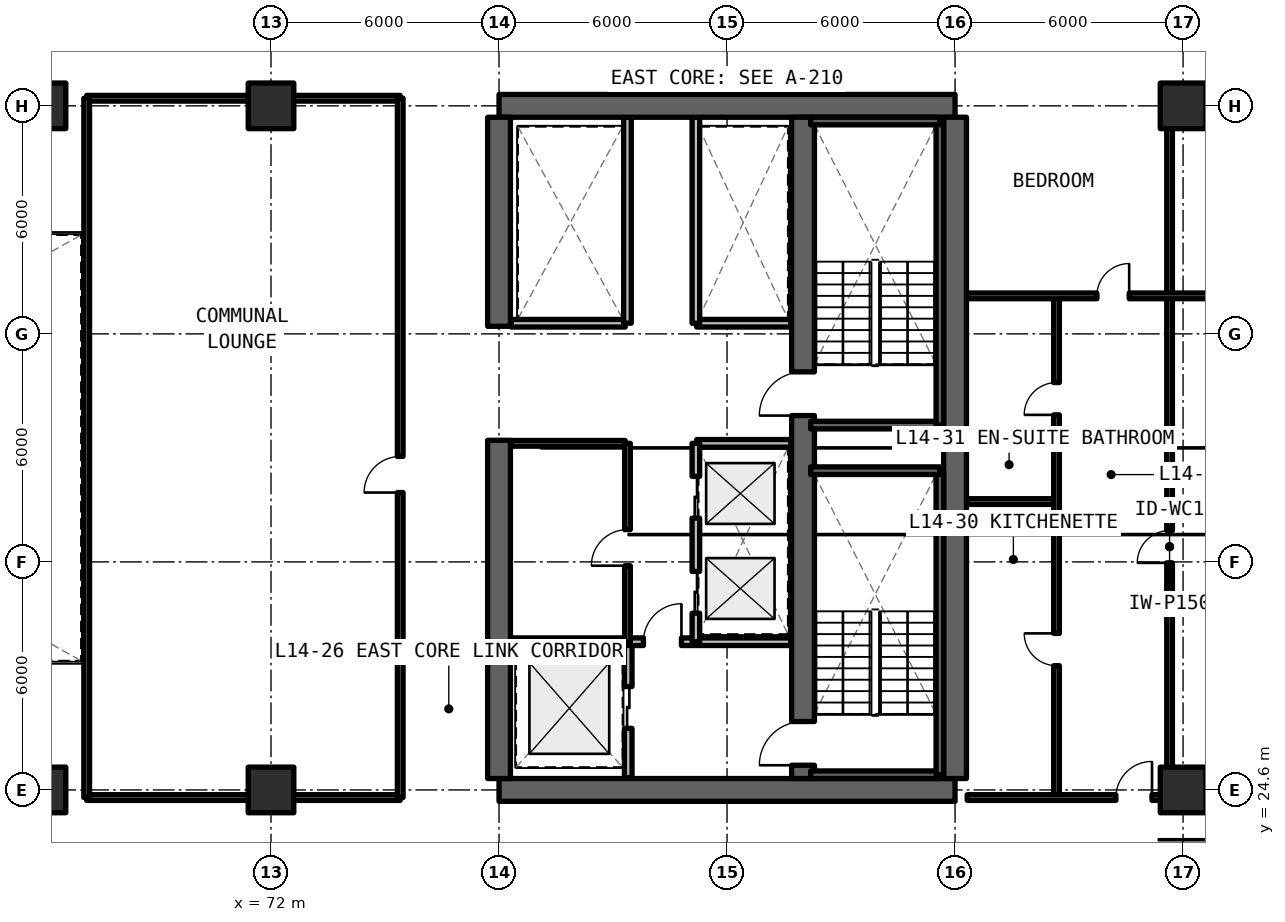
"""IFC4 building model, lengths in metres.
Left out: names, types, materials, properties, quantities, classifications, styles, units other than length and angle.
Written with IfcOpenShell. Run it as: python <this file> out.ifc"""

import sys

from ifc_helpers import new_model, si_unit, direction, frame, frame_2d, origin, origin_2d, place, context, subcontext, project, spatial, rectangle, extrude, element, fill, save


model = new_model("IFC4")
c1 = context("Model", 3, precision=1e-05, world=origin(), true_north=direction((0.0, 1.0)))
c2 = subcontext(c1, "Body", "Model", "MODEL_VIEW")
j1 = project(units=[si_unit("LENGTHUNIT", "METRE"), si_unit("PLANEANGLEUNIT", "RADIAN")], contexts=[c1])
p1 = place(None, origin())
s1 = spatial("IfcSite", under=j1, at=p1, CompositionType="ELEMENT")
p2 = place(p1, origin())
s2 = spatial("IfcBuilding", under=s1, at=p2, CompositionType="ELEMENT")
p3 = place(p2, frame((0.0, 0.0, 52.14)))
s3 = spatial("IfcBuildingStorey", under=s2, at=p3, CompositionType="ELEMENT", Elevation=52.14)
for number, where, z_axis, x_axis in (
    (1, (78.0, 24.6, 0.0), (0.0, 0.0, 1.0), (1.0, 0.0, 0.0)),
    (2, (90.0, 42.6, 0.0), (0.0, 0.0, 1.0), (-1.0, 0.0, 0.0)),
):
    element("IfcWall", number, at=place(p3, frame(where, z_axis=z_axis, x_axis=x_axis)), inside=s3, PredefinedType="SHEAR", context=c2, shape_type="SweptSolid", body=[
        extrude(rectangle(XDim=12.0, YDim=0.6, at=frame_2d((6.0, 0.0))), origin(), (0.0, 0.0, 1.0), 3.3),
    ])
p4 = place(p3, frame((90.0, 24.9, 0.0), z_axis=(0.0, 0.0, 1.0), x_axis=(0.0, 1.0, 0.0)))
e3 = element("IfcWall", 3, at=p4, inside=s3, PredefinedType="SHEAR", context=c2, shape_type="SweptSolid", body=[
    extrude(rectangle(XDim=17.4, YDim=0.6, at=frame_2d((8.7, 0.0))), origin(), (0.0, 0.0, 1.0), 3.3),
])
p5 = place(p3, frame((78.0, 24.9, 0.0), z_axis=(0.0, 0.0, 1.0), x_axis=(0.0, 1.0, 0.0)))
e4 = element("IfcWall", 4, at=p5, inside=s3, PredefinedType="SHEAR", context=c2, shape_type="SweptSolid", body=[
    extrude(rectangle(XDim=8.9, YDim=0.6, at=frame_2d((4.45, 0.0))), origin(), (0.0, 0.0, 1.0), 3.3),
])
p6 = place(p3, frame((78.0, 36.8, 0.0), z_axis=(0.0, 0.0, 1.0), x_axis=(0.0, 1.0, 0.0)))
e5 = element("IfcWall", 5, at=p6, inside=s3, PredefinedType="SHEAR", context=c2, shape_type="SweptSolid", body=[
    extrude(rectangle(XDim=5.5, YDim=0.6, at=frame_2d((2.75, 0.0))), origin(), (0.0, 0.0, 1.0), 3.3),
])
p7 = place(p3, frame((86.0, 24.9, 0.0), z_axis=(0.0, 0.0, 1.0), x_axis=(0.0, 1.0, 0.0)))
e6 = element("IfcWall", 6, at=p7, inside=s3, PredefinedType="SHEAR", context=c2, shape_type="SweptSolid", body=[
    extrude(rectangle(XDim=17.4, YDim=0.6, at=frame_2d((8.7, 0.0))), origin(), (0.0, 0.0, 1.0), 3.3),
])
p8 = place(p7, frame((0.35, 0.0, 0.0)))
e7 = element("IfcOpeningElement", 7, at=p8, cuts=e6, PredefinedType="OPENING", context=c2, shape_type="SweptSolid", body=[
    extrude(rectangle(XDim=1.15, YDim=2.15, at=frame_2d((0.575, 1.075))), frame((0.0, 0.31, 0.0), z_axis=(0.0, -1.0, 0.0), x_axis=(1.0, 0.0, 0.0)), (0.0, 0.0, 1.0), 0.62),
])
p9 = place(p7, frame((9.55, 0.0, 0.0)))
e8 = element("IfcOpeningElement", 8, at=p9, cuts=e6, PredefinedType="OPENING", context=c2, shape_type="SweptSolid", body=[
    extrude(rectangle(XDim=1.15, YDim=2.15, at=frame_2d((0.575, 1.075))), frame((0.0, 0.31, 0.0), z_axis=(0.0, -1.0, 0.0), x_axis=(1.0, 0.0, 0.0)), (0.0, 0.0, 1.0), 0.62),
])
for number, where, z_axis, x_axis in (
    (9, (66.0, 24.6, 0.0), (0.0, 0.0, 1.0), (1.0, 0.0, 0.0)),
    (10, (66.0, 42.6, 0.0), (0.0, 0.0, 1.0), (1.0, 0.0, 0.0)),
    (11, (72.0, 24.6, 0.0), (0.0, 0.0, 1.0), (1.0, 0.0, 0.0)),
    (12, (72.0, 42.6, 0.0), (0.0, 0.0, 1.0), (1.0, 0.0, 0.0)),
    (13, (96.0, 24.6, 0.0), (0.0, 0.0, 1.0), (1.0, 0.0, 0.0)),
    (14, (96.0, 42.6, 0.0), (0.0, 0.0, 1.0), (1.0, 0.0, 0.0)),
):
    element("IfcColumn", number, at=place(p3, frame(where, z_axis=z_axis, x_axis=x_axis)), inside=s3, PredefinedType="COLUMN", context=c2, shape_type="SweptSolid", body=[
        extrude(rectangle(XDim=1.2, YDim=1.2, at=origin_2d()), origin(), (0.0, 0.0, 1.0), 3.3),
    ])
p10 = place(p3, frame((81.4, 24.92, 0.0), z_axis=(0.0, 0.0, 1.0), x_axis=(0.0, 1.0, 0.0)))
e15 = element("IfcWall", 15, at=p10, inside=s3, PredefinedType="SOLIDWALL", context=c2, shape_type="SweptSolid", body=[
    extrude(rectangle(XDim=3.58, YDim=0.2, at=frame_2d((1.79, 0.0))), origin(), (0.0, 0.0, 1.0), 2.35),
])
p11 = place(p10, frame((1.3, 0.0, 0.0)))
e16 = element("IfcOpeningElement", 16, at=p11, cuts=e15, PredefinedType="OPENING", context=c2, shape_type="SweptSolid", body=[
    extrude(rectangle(XDim=1.1, YDim=2.2, at=frame_2d((0.55, 1.1))), frame((0.0, 0.11, 0.0), z_axis=(0.0, -1.0, 0.0), x_axis=(1.0, 0.0, 0.0)), (0.0, 0.0, 1.0), 0.22),
])
p12 = place(p3, frame((78.32, 28.5, 0.0), z_axis=(0.0, 0.0, 1.0), x_axis=(1.0, 0.0, 0.0)))
e17 = element("IfcWall", 17, at=p12, inside=s3, PredefinedType="SOLIDWALL", context=c2, shape_type="SweptSolid", body=[
    extrude(rectangle(XDim=7.36, YDim=0.2, at=frame_2d((3.68, 0.0))), origin(), (0.0, 0.0, 1.0), 2.35),
])
p13 = place(p12, frame((3.48, 0.0, 0.0)))
e18 = element("IfcOpeningElement", 18, at=p13, cuts=e17, PredefinedType="OPENING", context=c2, shape_type="SweptSolid", body=[
    extrude(rectangle(XDim=1.0, YDim=2.15, at=frame_2d((0.5, 1.075))), frame((0.0, 0.11, 0.0), z_axis=(0.0, -1.0, 0.0), x_axis=(1.0, 0.0, 0.0)), (0.0, 0.0, 1.0), 0.22),
])
p14 = place(p3, frame((83.2, 33.72, 0.0), z_axis=(0.0, 0.0, 1.0), x_axis=(1.0, 0.0, 0.0)))
e19 = element("IfcWall", 19, at=p14, inside=s3, PredefinedType="SOLIDWALL", context=c2, shape_type="SweptSolid", body=[
    extrude(rectangle(XDim=2.48, YDim=0.2, at=frame_2d((1.24, 0.0))), origin(), (0.0, 0.0, 1.0), 2.35),
])
p15 = place(p3, frame((83.18, 28.5, 0.0), z_axis=(0.0, 0.0, 1.0), x_axis=(0.0, 1.0, 0.0)))
e20 = element("IfcWall", 20, at=p15, inside=s3, PredefinedType="SOLIDWALL", context=c2, shape_type="SweptSolid", body=[
    extrude(rectangle(XDim=5.22, YDim=0.2, at=frame_2d((2.61, 0.0))), origin(), (0.0, 0.0, 1.0), 2.35),
])
p16 = place(p15, frame((0.75, 0.0, 0.0)))
e21 = element("IfcOpeningElement", 21, at=p16, cuts=e20, PredefinedType="OPENING", context=c2, shape_type="SweptSolid", body=[
    extrude(rectangle(XDim=1.1, YDim=2.2, at=frame_2d((0.55, 1.1))), frame((0.0, 0.11, 0.0), z_axis=(0.0, -1.0, 0.0), x_axis=(1.0, 0.0, 0.0)), (0.0, 0.0, 1.0), 0.22),
])
p17 = place(p15, frame((3.25, 0.0, 0.0)))
e22 = element("IfcOpeningElement", 22, at=p17, cuts=e20, PredefinedType="OPENING", context=c2, shape_type="SweptSolid", body=[
    extrude(rectangle(XDim=1.1, YDim=2.2, at=frame_2d((0.55, 1.1))), frame((0.0, 0.11, 0.0), z_axis=(0.0, -1.0, 0.0), x_axis=(1.0, 0.0, 0.0)), (0.0, 0.0, 1.0), 0.22),
])
p18 = place(p3, frame((78.32, 33.72, 0.0), z_axis=(0.0, 0.0, 1.0), x_axis=(1.0, 0.0, 0.0)))
e23 = element("IfcWall", 23, at=p18, inside=s3, PredefinedType="SOLIDWALL", context=c2, shape_type="SweptSolid", body=[
    extrude(rectangle(XDim=3.0, YDim=0.15, at=frame_2d((1.5, 0.0))), origin(), (0.0, 0.0, 1.0), 2.35),
])
p19 = place(p3, frame((81.38, 28.5, 0.0), z_axis=(0.0, 0.0, 1.0), x_axis=(0.0, 1.0, 0.0)))
e24 = element("IfcWall", 24, at=p19, inside=s3, PredefinedType="SOLIDWALL", context=c2, shape_type="SweptSolid", body=[
    extrude(rectangle(XDim=5.22, YDim=0.15, at=frame_2d((2.61, 0.0))), origin(), (0.0, 0.0, 1.0), 2.35),
])
p20 = place(p19, frame((2.0, 0.0, 0.0)))
e25 = element("IfcOpeningElement", 25, at=p20, cuts=e24, PredefinedType="OPENING", context=c2, shape_type="SweptSolid", body=[
    extrude(rectangle(XDim=0.95, YDim=2.15, at=frame_2d((0.475, 1.075))), frame((0.0, 0.085, 0.0), z_axis=(0.0, -1.0, 0.0), x_axis=(1.0, 0.0, 0.0)), (0.0, 0.0, 1.0), 0.17),
])
p21 = place(p3, frame((83.2, 36.88, 0.0), z_axis=(0.0, 0.0, 1.0), x_axis=(1.0, 0.0, 0.0)))
e26 = element("IfcWall", 26, at=p21, inside=s3, PredefinedType="SOLIDWALL", context=c2, shape_type="SweptSolid", body=[
    extrude(rectangle(XDim=2.48, YDim=0.2, at=frame_2d((1.24, 0.0))), origin(), (0.0, 0.0, 1.0), 2.35),
])
p22 = place(p3, frame((83.18, 36.88, 0.0), z_axis=(0.0, 0.0, 1.0), x_axis=(0.0, 1.0, 0.0)))
e27 = element("IfcWall", 27, at=p22, inside=s3, PredefinedType="SOLIDWALL", context=c2, shape_type="SweptSolid", body=[
    extrude(rectangle(XDim=5.42, YDim=0.2, at=frame_2d((2.71, 0.0))), origin(), (0.0, 0.0, 1.0), 2.35),
])
p23 = place(p3, frame((78.32, 36.88, 0.0), z_axis=(0.0, 0.0, 1.0), x_axis=(1.0, 0.0, 0.0)))
e28 = element("IfcWall", 28, at=p23, inside=s3, PredefinedType="SOLIDWALL", context=c2, shape_type="SweptSolid", body=[
    extrude(rectangle(XDim=3.0, YDim=0.2, at=frame_2d((1.5, 0.0))), origin(), (0.0, 0.0, 1.0), 2.35),
])
p24 = place(p3, frame((81.38, 36.88, 0.0), z_axis=(0.0, 0.0, 1.0), x_axis=(0.0, 1.0, 0.0)))
e29 = element("IfcWall", 29, at=p24, inside=s3, PredefinedType="SOLIDWALL", context=c2, shape_type="SweptSolid", body=[
    extrude(rectangle(XDim=5.42, YDim=0.2, at=frame_2d((2.71, 0.0))), origin(), (0.0, 0.0, 1.0), 2.35),
])
for number, where, z_axis, x_axis in (
    (30, (67.15, 24.4, 0.0), (0.0, 0.0, 1.0), (1.0, 0.0, 0.0)),
    (31, (67.15, 42.8, 0.0), (0.0, 0.0, 1.0), (1.0, 0.0, 0.0)),
):
    element("IfcWall", number, at=place(p3, frame(where, z_axis=z_axis, x_axis=x_axis)), inside=s3, PredefinedType="SOLIDWALL", context=c2, shape_type="SweptSolid", body=[
        extrude(rectangle(XDim=8.25, YDim=0.15, at=frame_2d((4.125, 0.0))), origin(), (0.0, 0.0, 1.0), 2.295),
    ])
p25 = place(p3, frame((67.15, 24.4, 0.0), z_axis=(0.0, 0.0, 1.0), x_axis=(0.0, 1.0, 0.0)))
e32 = element("IfcWall", 32, at=p25, inside=s3, PredefinedType="SOLIDWALL", context=c2, shape_type="SweptSolid", body=[
    extrude(rectangle(XDim=18.4, YDim=0.15, at=frame_2d((9.2, 0.0))), origin(), (0.0, 0.0, 1.0), 2.35),
])
p26 = place(p3, frame((75.4, 24.4, 0.0), z_axis=(0.0, 0.0, 1.0), x_axis=(0.0, 1.0, 0.0)))
e33 = element("IfcWall", 33, at=p26, inside=s3, PredefinedType="SOLIDWALL", context=c2, shape_type="SweptSolid", body=[
    extrude(rectangle(XDim=18.4, YDim=0.15, at=frame_2d((9.2, 0.0))), origin(), (0.0, 0.0, 1.0), 2.35),
])
p27 = place(p26, frame((8.025, 0.0, 0.0)))
e34 = element("IfcOpeningElement", 34, at=p27, cuts=e33, PredefinedType="OPENING", context=c2, shape_type="SweptSolid", body=[
    extrude(rectangle(XDim=0.95, YDim=2.15, at=frame_2d((0.475, 1.075))), frame((0.0, 0.085, 0.0), z_axis=(0.0, -1.0, 0.0), x_axis=(1.0, 0.0, 0.0)), (0.0, 0.0, 1.0), 0.17),
])
p28 = place(p3, frame((95.645, 24.4, 0.0), z_axis=(0.0, 0.0, 1.0), x_axis=(0.0, 1.0, 0.0)))
e35 = element("IfcWall", 35, at=p28, inside=s3, PredefinedType="PARTITIONING", context=c2, shape_type="SweptSolid", body=[
    extrude(rectangle(XDim=13.2, YDim=0.15, at=frame_2d((6.6, 0.0))), origin(), (0.0, 0.0, 1.0), 2.35),
])
p29 = place(p28, frame((6.175, 0.0, 0.0)))
e36 = element("IfcOpeningElement", 36, at=p29, cuts=e35, PredefinedType="OPENING", context=c2, shape_type="SweptSolid", body=[
    extrude(rectangle(XDim=0.85, YDim=2.1, at=frame_2d((0.425, 1.05))), frame((0.0, 0.085, 0.0), z_axis=(0.0, -1.0, 0.0), x_axis=(1.0, 0.0, 0.0)), (0.0, 0.0, 1.0), 0.17),
])
p30 = place(p3, frame((90.32, 32.188, 0.0), z_axis=(0.0, 0.0, 1.0), x_axis=(1.0, 0.0, 0.0)))
e37 = element("IfcWall", 37, at=p30, inside=s3, PredefinedType="PARTITIONING", context=c2, shape_type="SweptSolid", body=[
    extrude(rectangle(XDim=2.35, YDim=0.15, at=frame_2d((1.175, 0.0))), origin(), (0.0, 0.0, 1.0), 2.35),
])
p31 = place(p3, frame((92.67, 24.4, 0.0), z_axis=(0.0, 0.0, 1.0), x_axis=(0.0, 1.0, 0.0)))
e38 = element("IfcWall", 38, at=p31, inside=s3, PredefinedType="PARTITIONING", context=c2, shape_type="SweptSolid", body=[
    extrude(rectangle(XDim=13.2, YDim=0.15, at=frame_2d((6.6, 0.0))), origin(), (0.0, 0.0, 1.0), 2.35),
])
p32 = place(p31, frame((3.469, 0.0, 0.0)))
e39 = element("IfcOpeningElement", 39, at=p32, cuts=e38, PredefinedType="OPENING", context=c2, shape_type="SweptSolid", body=[
    extrude(rectangle(XDim=0.85, YDim=2.1, at=frame_2d((0.425, 1.05))), frame((0.0, 0.085, 0.0), z_axis=(0.0, -1.0, 0.0), x_axis=(1.0, 0.0, 0.0)), (0.0, 0.0, 1.0), 0.17),
])
p33 = place(p31, frame((10.069, 0.0, 0.0)))
e40 = element("IfcOpeningElement", 40, at=p33, cuts=e38, PredefinedType="OPENING", context=c2, shape_type="SweptSolid", body=[
    extrude(rectangle(XDim=0.85, YDim=2.1, at=frame_2d((0.425, 1.05))), frame((0.0, 0.085, 0.0), z_axis=(0.0, -1.0, 0.0), x_axis=(1.0, 0.0, 0.0)), (0.0, 0.0, 1.0), 0.17),
])
p34 = place(p3, frame((95.645, 37.6, 0.0), z_axis=(0.0, 0.0, 1.0), x_axis=(0.0, 1.0, 0.0)))
e41 = element("IfcWall", 41, at=p34, inside=s3, PredefinedType="PARTITIONING", context=c2, shape_type="SweptSolid", body=[
    extrude(rectangle(XDim=5.2, YDim=0.15, at=frame_2d((2.6, 0.0))), origin(), (0.0, 0.0, 1.0), 2.35),
])
p35 = place(p3, frame((90.32, 37.6, 0.0), z_axis=(0.0, 0.0, 1.0), x_axis=(1.0, 0.0, 0.0)))
e42 = element("IfcWall", 42, at=p35, inside=s3, PredefinedType="PARTITIONING", context=c2, shape_type="SweptSolid", body=[
    extrude(rectangle(XDim=10.24, YDim=0.15, at=frame_2d((5.12, 0.0))), origin(), (0.0, 0.0, 1.0), 2.35),
])
p36 = place(p35, frame((3.412, 0.0, 0.0)))
e43 = element("IfcOpeningElement", 43, at=p36, cuts=e42, PredefinedType="OPENING", context=c2, shape_type="SweptSolid", body=[
    extrude(rectangle(XDim=0.85, YDim=2.1, at=frame_2d((0.425, 1.05))), frame((0.0, 0.085, 0.0), z_axis=(0.0, -1.0, 0.0), x_axis=(1.0, 0.0, 0.0)), (0.0, 0.0, 1.0), 0.17),
])
p37 = place(p35, frame((7.357, 0.0, 0.0)))
e44 = element("IfcOpeningElement", 44, at=p37, cuts=e42, PredefinedType="OPENING", context=c2, shape_type="SweptSolid", body=[
    extrude(rectangle(XDim=0.85, YDim=2.1, at=frame_2d((0.425, 1.05))), frame((0.0, 0.085, 0.0), z_axis=(0.0, -1.0, 0.0), x_axis=(1.0, 0.0, 0.0)), (0.0, 0.0, 1.0), 0.17),
])
p38 = place(p3, frame((90.32, 24.4, 0.0), z_axis=(0.0, 0.0, 1.0), x_axis=(1.0, 0.0, 0.0)))
e45 = element("IfcWall", 45, at=p38, inside=s3, PredefinedType="SOLIDWALL", context=c2, shape_type="SweptSolid", body=[
    extrude(rectangle(XDim=10.24, YDim=0.15, at=frame_2d((5.12, 0.0))), origin(), (0.0, 0.0, 1.0), 2.295),
])
p39 = place(p38, frame((3.913, 0.0, 0.0)))
e46 = element("IfcOpeningElement", 46, at=p39, cuts=e45, PredefinedType="OPENING", context=c2, shape_type="SweptSolid", body=[
    extrude(rectangle(XDim=0.95, YDim=2.15, at=frame_2d((0.475, 1.075))), frame((0.0, 0.085, 0.0), z_axis=(0.0, -1.0, 0.0), x_axis=(1.0, 0.0, 0.0)), (0.0, 0.0, 1.0), 0.17),
])
p40 = place(p3, frame((86.2, 25.0, 0.0), z_axis=(0.0, 0.0, 1.0), x_axis=(1.0, 0.0, 0.0)))
e47 = element("IfcWall", 47, at=p40, inside=s3, PredefinedType="SOLIDWALL", context=c2, shape_type="SweptSolid", body=[
    extrude(rectangle(XDim=3.4, YDim=0.2, at=frame_2d((1.7, 0.0))), origin(), (0.0, 0.0, 1.0), 3.3),
])
p41 = place(p3, frame((89.6, 25.0, 0.0), z_axis=(0.0, 0.0, 1.0), x_axis=(0.0, 1.0, 0.0)))
e48 = element("IfcWall", 48, at=p41, inside=s3, PredefinedType="SOLIDWALL", context=c2, shape_type="SweptSolid", body=[
    extrude(rectangle(XDim=8.0, YDim=0.2, at=frame_2d((4.0, 0.0))), origin(), (0.0, 0.0, 1.0), 3.3),
])
for number, where, z_axis, x_axis in (
    (49, (89.6, 33.0, 0.0), (0.0, 0.0, 1.0), (-1.0, 0.0, 0.0)),
    (50, (86.2, 34.2, 0.0), (0.0, 0.0, 1.0), (1.0, 0.0, 0.0)),
):
    element("IfcWall", number, at=place(p3, frame(where, z_axis=z_axis, x_axis=x_axis)), inside=s3, PredefinedType="SOLIDWALL", context=c2, shape_type="SweptSolid", body=[
        extrude(rectangle(XDim=3.4, YDim=0.2, at=frame_2d((1.7, 0.0))), origin(), (0.0, 0.0, 1.0), 3.3),
    ])
p42 = place(p3, frame((89.6, 34.2, 0.0), z_axis=(0.0, 0.0, 1.0), x_axis=(0.0, 1.0, 0.0)))
e51 = element("IfcWall", 51, at=p42, inside=s3, PredefinedType="SOLIDWALL", context=c2, shape_type="SweptSolid", body=[
    extrude(rectangle(XDim=8.0, YDim=0.2, at=frame_2d((4.0, 0.0))), origin(), (0.0, 0.0, 1.0), 3.3),
])
p43 = place(p3, frame((89.6, 42.2, 0.0), z_axis=(0.0, 0.0, 1.0), x_axis=(-1.0, 0.0, 0.0)))
e52 = element("IfcWall", 52, at=p43, inside=s3, PredefinedType="SOLIDWALL", context=c2, shape_type="SweptSolid", body=[
    extrude(rectangle(XDim=3.4, YDim=0.2, at=frame_2d((1.7, 0.0))), origin(), (0.0, 0.0, 1.0), 3.3),
])
p44 = place(p11, origin())
e53 = element("IfcDoor", 53, at=p44, inside=s3, OperationType="SLIDING_TO_LEFT", PredefinedType="DOOR", context=c2, shape_type="SweptSolid", body=[
    extrude(rectangle(XDim=1.1, YDim=2.2, at=frame_2d((0.55, 1.1))), frame((0.0, 0.025, 0.0), z_axis=(0.0, -1.0, 0.0), x_axis=(1.0, 0.0, 0.0)), (0.0, 0.0, 1.0), 0.05),
])
fill(e16, e53)
p45 = place(p13, origin())
e54 = element("IfcDoor", 54, at=p45, inside=s3, OperationType="SINGLE_SWING_RIGHT", PredefinedType="DOOR", context=c2, shape_type="SweptSolid", body=[
    extrude(rectangle(XDim=1.0, YDim=2.15, at=frame_2d((0.5, 1.075))), frame((0.0, 0.025, 0.0), z_axis=(0.0, -1.0, 0.0), x_axis=(1.0, 0.0, 0.0)), (0.0, 0.0, 1.0), 0.05),
])
fill(e18, e54)
p46 = place(p16, origin())
e55 = element("IfcDoor", 55, at=p46, inside=s3, OperationType="SLIDING_TO_LEFT", PredefinedType="DOOR", context=c2, shape_type="SweptSolid", body=[
    extrude(rectangle(XDim=1.1, YDim=2.2, at=frame_2d((0.55, 1.1))), frame((0.0, 0.025, 0.0), z_axis=(0.0, -1.0, 0.0), x_axis=(1.0, 0.0, 0.0)), (0.0, 0.0, 1.0), 0.05),
])
fill(e21, e55)
p47 = place(p17, origin())
e56 = element("IfcDoor", 56, at=p47, inside=s3, OperationType="SLIDING_TO_RIGHT", PredefinedType="DOOR", context=c2, shape_type="SweptSolid", body=[
    extrude(rectangle(XDim=1.1, YDim=2.2, at=frame_2d((0.55, 1.1))), frame((0.0, 0.025, 0.0), z_axis=(0.0, -1.0, 0.0), x_axis=(1.0, 0.0, 0.0)), (0.0, 0.0, 1.0), 0.05),
])
fill(e22, e56)
p48 = place(p20, origin())
e57 = element("IfcDoor", 57, at=p48, inside=s3, OperationType="SINGLE_SWING_LEFT", PredefinedType="DOOR", context=c2, shape_type="SweptSolid", body=[
    extrude(rectangle(XDim=0.95, YDim=2.15, at=frame_2d((0.475, 1.075))), frame((0.0, 0.025, 0.0), z_axis=(0.0, -1.0, 0.0), x_axis=(1.0, 0.0, 0.0)), (0.0, 0.0, 1.0), 0.05),
])
fill(e25, e57)
p49 = place(p27, origin())
e58 = element("IfcDoor", 58, at=p49, inside=s3, OperationType="SINGLE_SWING_LEFT", PredefinedType="DOOR", context=c2, shape_type="SweptSolid", body=[
    extrude(rectangle(XDim=0.95, YDim=2.15, at=frame_2d((0.475, 1.075))), frame((0.0, 0.025, 0.0), z_axis=(0.0, -1.0, 0.0), x_axis=(1.0, 0.0, 0.0)), (0.0, 0.0, 1.0), 0.05),
])
fill(e34, e58)
p50 = place(p29, origin())
e59 = element("IfcDoor", 59, at=p50, inside=s3, OperationType="SINGLE_SWING_LEFT", PredefinedType="DOOR", context=c2, shape_type="SweptSolid", body=[
    extrude(rectangle(XDim=0.85, YDim=2.1, at=frame_2d((0.425, 1.05))), frame((0.0, 0.025, 0.0), z_axis=(0.0, -1.0, 0.0), x_axis=(1.0, 0.0, 0.0)), (0.0, 0.0, 1.0), 0.05),
])
fill(e36, e59)
p51 = place(p32, origin())
e60 = element("IfcDoor", 60, at=p51, inside=s3, OperationType="SINGLE_SWING_RIGHT", PredefinedType="DOOR", context=c2, shape_type="SweptSolid", body=[
    extrude(rectangle(XDim=0.85, YDim=2.1, at=frame_2d((0.425, 1.05))), frame((0.0, 0.025, 0.0), z_axis=(0.0, -1.0, 0.0), x_axis=(1.0, 0.0, 0.0)), (0.0, 0.0, 1.0), 0.05),
])
fill(e39, e60)
p52 = place(p33, origin())
e61 = element("IfcDoor", 61, at=p52, inside=s3, OperationType="SINGLE_SWING_LEFT", PredefinedType="DOOR", context=c2, shape_type="SweptSolid", body=[
    extrude(rectangle(XDim=0.85, YDim=2.1, at=frame_2d((0.425, 1.05))), frame((0.0, 0.025, 0.0), z_axis=(0.0, -1.0, 0.0), x_axis=(1.0, 0.0, 0.0)), (0.0, 0.0, 1.0), 0.05),
])
fill(e40, e61)
p53 = place(p36, origin())
e62 = element("IfcDoor", 62, at=p53, inside=s3, OperationType="SINGLE_SWING_RIGHT", PredefinedType="DOOR", context=c2, shape_type="SweptSolid", body=[
    extrude(rectangle(XDim=0.85, YDim=2.1, at=frame_2d((0.425, 1.05))), frame((0.0, 0.025, 0.0), z_axis=(0.0, -1.0, 0.0), x_axis=(1.0, 0.0, 0.0)), (0.0, 0.0, 1.0), 0.05),
])
fill(e43, e62)
p54 = place(p39, origin())
e63 = element("IfcDoor", 63, at=p54, inside=s3, OperationType="SINGLE_SWING_RIGHT", PredefinedType="DOOR", context=c2, shape_type="SweptSolid", body=[
    extrude(rectangle(XDim=0.95, YDim=2.15, at=frame_2d((0.475, 1.075))), frame((0.0, 0.025, 0.0), z_axis=(0.0, -1.0, 0.0), x_axis=(1.0, 0.0, 0.0)), (0.0, 0.0, 1.0), 0.05),
])
fill(e46, e63)
p55 = place(p8, origin())
e64 = element("IfcDoor", 64, at=p55, inside=s3, OperationType="SINGLE_SWING_LEFT", PredefinedType="DOOR", context=c2, shape_type="SweptSolid", body=[
    extrude(rectangle(XDim=1.15, YDim=2.15, at=frame_2d((0.575, 1.075))), frame((0.0, 0.025, 0.0), z_axis=(0.0, -1.0, 0.0), x_axis=(1.0, 0.0, 0.0)), (0.0, 0.0, 1.0), 0.05),
])
fill(e7, e64)
p56 = place(p9, origin())
e65 = element("IfcDoor", 65, at=p56, inside=s3, OperationType="SINGLE_SWING_RIGHT", PredefinedType="DOOR", context=c2, shape_type="SweptSolid", body=[
    extrude(rectangle(XDim=1.15, YDim=2.15, at=frame_2d((0.575, 1.075))), frame((0.0, 0.025, 0.0), z_axis=(0.0, -1.0, 0.0), x_axis=(1.0, 0.0, 0.0)), (0.0, 0.0, 1.0), 0.05),
])
fill(e8, e65)
save(model, sys.argv[1])
